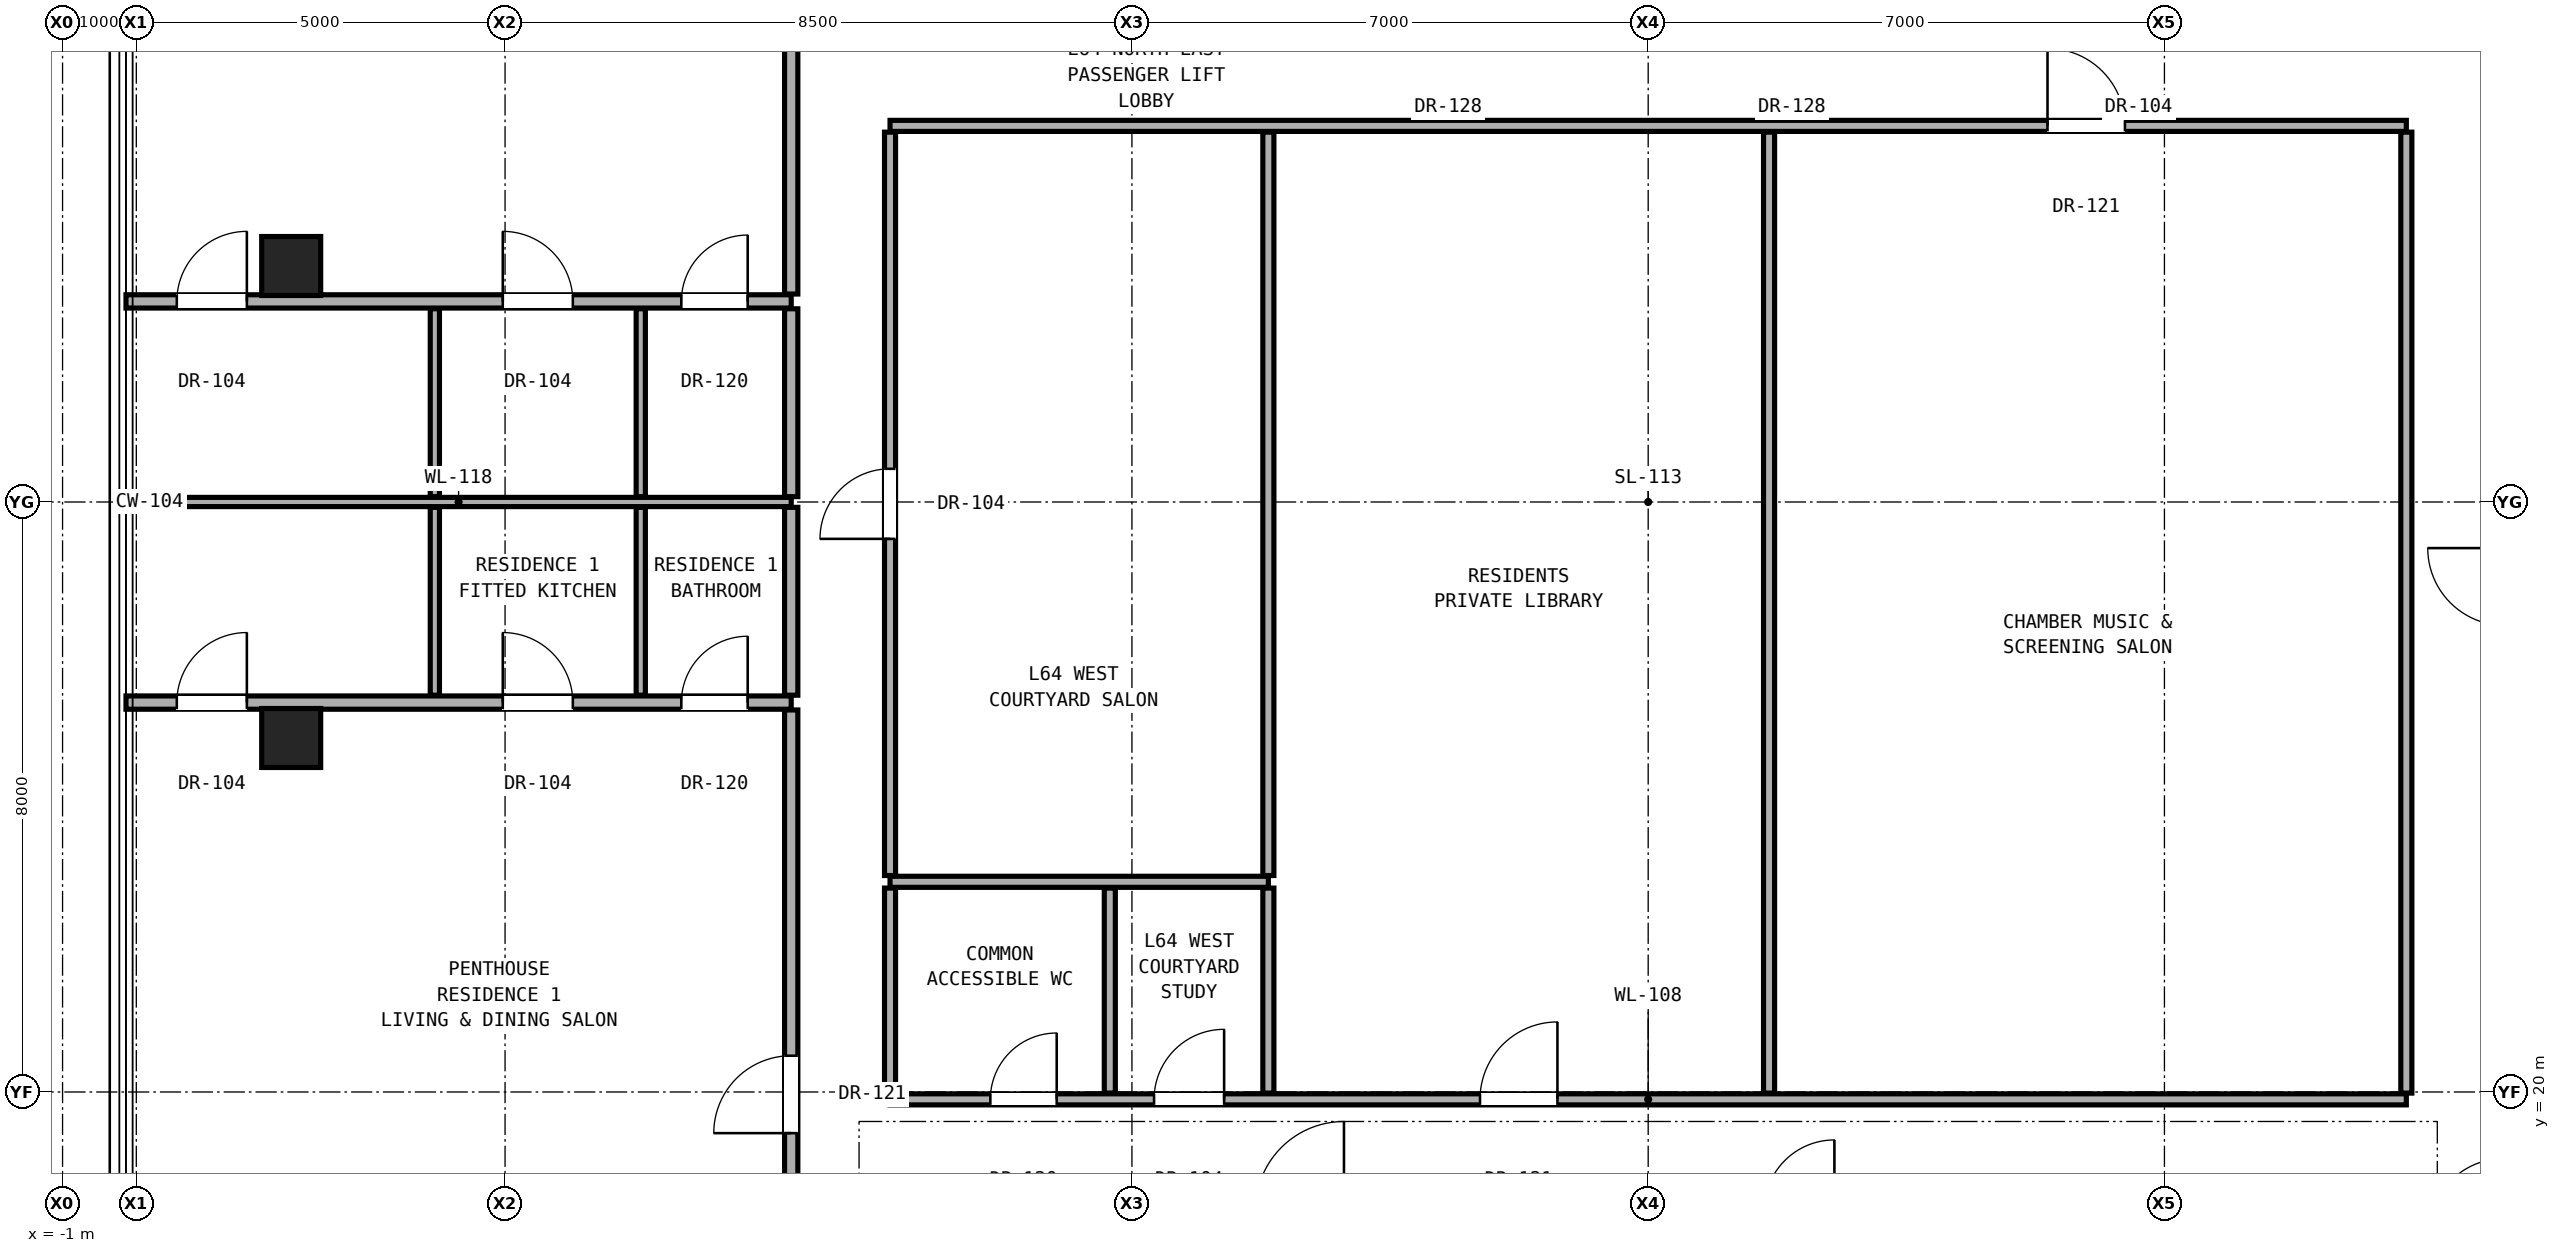
"""IFC4 building model, lengths in metres.
Left out: names, types, materials, properties, quantities, classifications, styles, units other than length and angle.
Written with IfcOpenShell. Run it as: python <this file> out.ifc"""

import sys

from ifc_helpers import new_model, si_unit, direction, frame, frame_2d, origin, origin_2d, place, context, subcontext, project, spatial, rectangle, hollow_rectangle, extrude, element, fill, save


model = new_model("IFC4")
c1 = context("Model", 3, precision=1e-05, world=origin(), true_north=direction((0.0, 1.0)))
c2 = subcontext(c1, "Body", "Model", "MODEL_VIEW")
j1 = project(units=[si_unit("LENGTHUNIT", "METRE"), si_unit("PLANEANGLEUNIT", "RADIAN")], contexts=[c1])
p1 = place(None, origin())
s1 = spatial("IfcSite", under=j1, at=p1, CompositionType="ELEMENT")
p2 = place(p1, origin())
s2 = spatial("IfcBuilding", under=s1, at=p2, CompositionType="ELEMENT")
p3 = place(p2, frame((0.0, 0.0, 226.0)))
s3 = spatial("IfcBuildingStorey", under=s2, at=p3, CompositionType="ELEMENT", Elevation=226.0)
for number, where, z_axis, x_axis in (
    (1, (2.1, 24.8, 0.0), (0.0, 0.0, 1.0), (1.0, 0.0, 0.0)),
    (2, (2.1, 31.2, 0.0), (0.0, 0.0, 1.0), (1.0, 0.0, 0.0)),
):
    element("IfcColumn", number, at=place(p3, frame(where, z_axis=z_axis, x_axis=x_axis)), inside=s3, PredefinedType="COLUMN", context=c2, shape_type="SweptSolid", body=[
        extrude(hollow_rectangle(XDim=0.8, YDim=0.8, WallThickness=0.045, at=origin_2d()), origin(), (0.0, 0.0, 1.0), 3.3),
    ])
p4 = place(p3, frame((10.22, 19.9, 0.0), z_axis=(0.0, 0.0, 1.0), x_axis=(1.0, 0.0, 0.0)))
e3 = element("IfcWall", 3, at=p4, inside=s3, PredefinedType="PARTITIONING", context=c2, shape_type="SweptSolid", body=[
    extrude(rectangle(XDim=20.56, YDim=0.15, at=frame_2d((10.28, 0.0))), origin(), (0.0, 0.0, 1.0), 2.236),
])
p5 = place(p4, frame((1.36, 0.0, 0.0)))
e4 = element("IfcOpeningElement", 4, at=p5, cuts=e3, PredefinedType="OPENING", context=c2, shape_type="SweptSolid", body=[
    extrude(rectangle(XDim=0.9, YDim=2.1, at=frame_2d((0.45, 1.05))), frame((0.0, 0.085, 0.0), z_axis=(0.0, -1.0, 0.0), x_axis=(1.0, 0.0, 0.0)), (0.0, 0.0, 1.0), 0.17),
])
p6 = place(p4, frame((3.58, 0.0, 0.0)))
e5 = element("IfcOpeningElement", 5, at=p6, cuts=e3, PredefinedType="OPENING", context=c2, shape_type="SweptSolid", body=[
    extrude(rectangle(XDim=0.95, YDim=2.15, at=frame_2d((0.475, 1.075))), frame((0.0, 0.085, 0.0), z_axis=(0.0, -1.0, 0.0), x_axis=(1.0, 0.0, 0.0)), (0.0, 0.0, 1.0), 0.17),
])
p7 = place(p4, frame((8.0, 0.0, 0.0)))
e6 = element("IfcOpeningElement", 6, at=p7, cuts=e3, PredefinedType="OPENING", context=c2, shape_type="SweptSolid", body=[
    extrude(rectangle(XDim=1.05, YDim=2.2, at=frame_2d((0.525, 1.1))), frame((0.0, 0.085, 0.0), z_axis=(0.0, -1.0, 0.0), x_axis=(1.0, 0.0, 0.0)), (0.0, 0.0, 1.0), 0.17),
])
p8 = place(p3, frame((10.22, 22.85, 0.0), z_axis=(0.0, 0.0, 1.0), x_axis=(1.0, 0.0, 0.0)))
e7 = element("IfcWall", 7, at=p8, inside=s3, PredefinedType="PARTITIONING", context=c2, shape_type="SweptSolid", body=[
    extrude(rectangle(XDim=5.13, YDim=0.15, at=frame_2d((2.565, 0.0))), origin(), (0.0, 0.0, 1.0), 2.236),
])
p9 = place(p3, frame((-0.14, 25.28, 0.0), z_axis=(0.0, 0.0, 1.0), x_axis=(1.0, 0.0, 0.0)))
e8 = element("IfcWall", 8, at=p9, inside=s3, PredefinedType="PARTITIONING", context=c2, shape_type="SweptSolid", body=[
    extrude(rectangle(XDim=9.02, YDim=0.18, at=frame_2d((4.51, 0.0))), origin(), (0.0, 0.0, 1.0), 2.319),
])
p10 = place(p9, frame((0.689, 0.0, 0.0)))
e9 = element("IfcOpeningElement", 9, at=p10, cuts=e8, PredefinedType="OPENING", context=c2, shape_type="SweptSolid", body=[
    extrude(rectangle(XDim=0.95, YDim=2.15, at=frame_2d((0.475, 1.075))), frame((0.0, 0.1, 0.0), z_axis=(0.0, -1.0, 0.0), x_axis=(1.0, 0.0, 0.0)), (0.0, 0.0, 1.0), 0.2),
])
p11 = place(p9, frame((5.109, 0.0, 0.0)))
e10 = element("IfcOpeningElement", 10, at=p11, cuts=e8, PredefinedType="OPENING", context=c2, shape_type="SweptSolid", body=[
    extrude(rectangle(XDim=0.95, YDim=2.15, at=frame_2d((0.475, 1.075))), frame((0.0, 0.1, 0.0), z_axis=(0.0, -1.0, 0.0), x_axis=(1.0, 0.0, 0.0)), (0.0, 0.0, 1.0), 0.2),
])
p12 = place(p9, frame((7.53, 0.0, 0.0)))
e11 = element("IfcOpeningElement", 11, at=p12, cuts=e8, PredefinedType="OPENING", context=c2, shape_type="SweptSolid", body=[
    extrude(rectangle(XDim=0.9, YDim=2.1, at=frame_2d((0.45, 1.05))), frame((0.0, 0.1, 0.0), z_axis=(0.0, -1.0, 0.0), x_axis=(1.0, 0.0, 0.0)), (0.0, 0.0, 1.0), 0.2),
])
p13 = place(p3, frame((-0.14, 28.0, 0.0), z_axis=(0.0, 0.0, 1.0), x_axis=(1.0, 0.0, 0.0)))
e12 = element("IfcWall", 12, at=p13, inside=s3, PredefinedType="PARTITIONING", context=c2, shape_type="SweptSolid", body=[
    extrude(rectangle(XDim=9.02, YDim=0.125, at=frame_2d((4.51, 0.0))), origin(), (0.0, 0.0, 1.0), 2.319),
])
p14 = place(p3, frame((-0.14, 30.72, 0.0), z_axis=(0.0, 0.0, 1.0), x_axis=(1.0, 0.0, 0.0)))
e13 = element("IfcWall", 13, at=p14, inside=s3, PredefinedType="PARTITIONING", context=c2, shape_type="SweptSolid", body=[
    extrude(rectangle(XDim=9.02, YDim=0.18, at=frame_2d((4.51, 0.0))), origin(), (0.0, 0.0, 1.0), 2.319),
])
p15 = place(p14, frame((0.689, 0.0, 0.0)))
e14 = element("IfcOpeningElement", 14, at=p15, cuts=e13, PredefinedType="OPENING", context=c2, shape_type="SweptSolid", body=[
    extrude(rectangle(XDim=0.95, YDim=2.15, at=frame_2d((0.475, 1.075))), frame((0.0, 0.1, 0.0), z_axis=(0.0, -1.0, 0.0), x_axis=(1.0, 0.0, 0.0)), (0.0, 0.0, 1.0), 0.2),
])
p16 = place(p14, frame((5.109, 0.0, 0.0)))
e15 = element("IfcOpeningElement", 15, at=p16, cuts=e13, PredefinedType="OPENING", context=c2, shape_type="SweptSolid", body=[
    extrude(rectangle(XDim=0.95, YDim=2.15, at=frame_2d((0.475, 1.075))), frame((0.0, 0.1, 0.0), z_axis=(0.0, -1.0, 0.0), x_axis=(1.0, 0.0, 0.0)), (0.0, 0.0, 1.0), 0.2),
])
p17 = place(p14, frame((7.53, 0.0, 0.0)))
e16 = element("IfcOpeningElement", 16, at=p17, cuts=e13, PredefinedType="OPENING", context=c2, shape_type="SweptSolid", body=[
    extrude(rectangle(XDim=0.9, YDim=2.1, at=frame_2d((0.45, 1.05))), frame((0.0, 0.1, 0.0), z_axis=(0.0, -1.0, 0.0), x_axis=(1.0, 0.0, 0.0)), (0.0, 0.0, 1.0), 0.2),
])
p18 = place(p3, frame((10.22, 33.1, 0.0), z_axis=(0.0, 0.0, 1.0), x_axis=(1.0, 0.0, 0.0)))
e17 = element("IfcWall", 17, at=p18, inside=s3, PredefinedType="PARTITIONING", context=c2, shape_type="SweptSolid", body=[
    extrude(rectangle(XDim=20.56, YDim=0.15, at=frame_2d((10.28, 0.0))), origin(), (0.0, 0.0, 1.0), 2.236),
])
p19 = place(p18, frame((15.695, 0.0, 0.0)))
e18 = element("IfcOpeningElement", 18, at=p19, cuts=e17, PredefinedType="OPENING", context=c2, shape_type="SweptSolid", body=[
    extrude(rectangle(XDim=1.05, YDim=2.2, at=frame_2d((0.525, 1.1))), frame((0.0, 0.085, 0.0), z_axis=(0.0, -1.0, 0.0), x_axis=(1.0, 0.0, 0.0)), (0.0, 0.0, 1.0), 0.17),
])
for number, where, z_axis, x_axis in (
    (19, (4.048, 25.38, 0.0), (0.0, 0.0, 1.0), (0.0, 1.0, 0.0)),
    (20, (4.048, 28.073, 0.0), (0.0, 0.0, 1.0), (0.0, 1.0, 0.0)),
    (21, (6.84, 25.38, 0.0), (0.0, 0.0, 1.0), (0.0, 1.0, 0.0)),
    (22, (6.84, 28.073, 0.0), (0.0, 0.0, 1.0), (0.0, 1.0, 0.0)),
):
    element("IfcWall", number, at=place(p3, frame(where, z_axis=z_axis, x_axis=x_axis)), inside=s3, PredefinedType="PARTITIONING", context=c2, shape_type="SweptSolid", body=[
        extrude(rectangle(XDim=2.548, YDim=0.125, at=frame_2d((1.274, 0.0))), origin(), (0.0, 0.0, 1.0), 3.1),
    ])
p20 = place(p3, frame((8.88, 14.754, 0.0), z_axis=(0.0, 0.0, 1.0), x_axis=(0.0, 1.0, 0.0)))
e23 = element("IfcWall", 23, at=p20, inside=s3, PredefinedType="PARTITIONING", context=c2, shape_type="SweptSolid", body=[
    extrude(rectangle(XDim=10.426, YDim=0.18, at=frame_2d((5.213, 0.0))), origin(), (0.0, 0.0, 1.0), 2.396),
])
p21 = place(p20, frame((4.688, 0.0, 0.0)))
e24 = element("IfcOpeningElement", 24, at=p21, cuts=e23, PredefinedType="OPENING", context=c2, shape_type="SweptSolid", body=[
    extrude(rectangle(XDim=1.05, YDim=2.2, at=frame_2d((0.525, 1.1))), frame((0.0, 0.1, 0.0), z_axis=(0.0, -1.0, 0.0), x_axis=(1.0, 0.0, 0.0)), (0.0, 0.0, 1.0), 0.2),
])
for number, where, z_axis, x_axis in (
    (25, (8.88, 25.38, 0.0), (0.0, 0.0, 1.0), (0.0, 1.0, 0.0)),
    (26, (8.88, 28.073, 0.0), (0.0, 0.0, 1.0), (0.0, 1.0, 0.0)),
):
    element("IfcWall", number, at=place(p3, frame(where, z_axis=z_axis, x_axis=x_axis)), inside=s3, PredefinedType="PARTITIONING", context=c2, shape_type="SweptSolid", body=[
        extrude(rectangle(XDim=2.548, YDim=0.18, at=frame_2d((1.274, 0.0))), origin(), (0.0, 0.0, 1.0), 3.1),
    ])
p22 = place(p3, frame((8.88, 30.82, 0.0), z_axis=(0.0, 0.0, 1.0), x_axis=(0.0, 1.0, 0.0)))
e27 = element("IfcWall", 27, at=p22, inside=s3, PredefinedType="PARTITIONING", context=c2, shape_type="SweptSolid", body=[
    extrude(rectangle(XDim=10.426, YDim=0.18, at=frame_2d((5.213, 0.0))), origin(), (0.0, 0.0, 1.0), 2.396),
])
p23 = place(p22, frame((4.688, 0.0, 0.0)))
e28 = element("IfcOpeningElement", 28, at=p23, cuts=e27, PredefinedType="OPENING", context=c2, shape_type="SweptSolid", body=[
    extrude(rectangle(XDim=1.05, YDim=2.2, at=frame_2d((0.525, 1.1))), frame((0.0, 0.1, 0.0), z_axis=(0.0, -1.0, 0.0), x_axis=(1.0, 0.0, 0.0)), (0.0, 0.0, 1.0), 0.2),
])
p24 = place(p3, frame((10.22, 19.985, 0.0), z_axis=(0.0, 0.0, 1.0), x_axis=(0.0, 1.0, 0.0)))
e29 = element("IfcWall", 29, at=p24, inside=s3, PredefinedType="PARTITIONING", context=c2, shape_type="SweptSolid", body=[
    extrude(rectangle(XDim=2.78, YDim=0.15, at=frame_2d((1.39, 0.0))), origin(), (0.0, 0.0, 1.0), 3.1),
])
p25 = place(p3, frame((10.22, 22.935, 0.0), z_axis=(0.0, 0.0, 1.0), x_axis=(0.0, 1.0, 0.0)))
e30 = element("IfcWall", 30, at=p25, inside=s3, PredefinedType="PARTITIONING", context=c2, shape_type="SweptSolid", body=[
    extrude(rectangle(XDim=10.08, YDim=0.15, at=frame_2d((5.04, 0.0))), origin(), (0.0, 0.0, 1.0), 2.396),
])
p26 = place(p25, frame((4.565, 0.0, 0.0)))
e31 = element("IfcOpeningElement", 31, at=p26, cuts=e30, PredefinedType="OPENING", context=c2, shape_type="SweptSolid", body=[
    extrude(rectangle(XDim=0.95, YDim=2.15, at=frame_2d((0.475, 1.075))), frame((0.0, 0.085, 0.0), z_axis=(0.0, -1.0, 0.0), x_axis=(1.0, 0.0, 0.0)), (0.0, 0.0, 1.0), 0.17),
])
for number, where, z_axis, x_axis in (
    (32, (13.2, 19.985, 0.0), (0.0, 0.0, 1.0), (0.0, 1.0, 0.0)),
    (33, (15.35, 19.985, 0.0), (0.0, 0.0, 1.0), (0.0, 1.0, 0.0)),
):
    element("IfcWall", number, at=place(p3, frame(where, z_axis=z_axis, x_axis=x_axis)), inside=s3, PredefinedType="PARTITIONING", context=c2, shape_type="SweptSolid", body=[
        extrude(rectangle(XDim=2.78, YDim=0.15, at=frame_2d((1.39, 0.0))), origin(), (0.0, 0.0, 1.0), 3.1),
    ])
p27 = place(p3, frame((15.35, 22.935, 0.0), z_axis=(0.0, 0.0, 1.0), x_axis=(0.0, 1.0, 0.0)))
e34 = element("IfcWall", 34, at=p27, inside=s3, PredefinedType="PARTITIONING", context=c2, shape_type="SweptSolid", body=[
    extrude(rectangle(XDim=10.08, YDim=0.15, at=frame_2d((5.04, 0.0))), origin(), (0.0, 0.0, 1.0), 2.236),
])
p28 = place(p3, frame((22.139, 19.985, 0.0), z_axis=(0.0, 0.0, 1.0), x_axis=(0.0, 1.0, 0.0)))
e35 = element("IfcWall", 35, at=p28, inside=s3, PredefinedType="PARTITIONING", context=c2, shape_type="SweptSolid", body=[
    extrude(rectangle(XDim=13.03, YDim=0.15, at=frame_2d((6.515, 0.0))), origin(), (0.0, 0.0, 1.0), 2.236),
])
p29 = place(p3, frame((30.78, 19.985, 0.0), z_axis=(0.0, 0.0, 1.0), x_axis=(0.0, 1.0, 0.0)))
e36 = element("IfcWall", 36, at=p29, inside=s3, PredefinedType="PARTITIONING", context=c2, shape_type="SweptSolid", body=[
    extrude(rectangle(XDim=13.03, YDim=0.15, at=frame_2d((6.515, 0.0))), origin(), (0.0, 0.0, 1.0), 2.396),
])
p30 = place(p5, origin())
e37 = element("IfcDoor", 37, at=p30, inside=s3, OperationType="SINGLE_SWING_RIGHT", PredefinedType="DOOR", context=c2, shape_type="SweptSolid", body=[
    extrude(rectangle(XDim=0.9, YDim=2.1, at=frame_2d((0.45, 1.05))), frame((0.0, 0.025, 0.0), z_axis=(0.0, -1.0, 0.0), x_axis=(1.0, 0.0, 0.0)), (0.0, 0.0, 1.0), 0.05),
])
fill(e4, e37)
p31 = place(p21, origin())
e38 = element("IfcDoor", 38, at=p31, inside=s3, OperationType="SINGLE_SWING_LEFT", PredefinedType="DOOR", context=c2, shape_type="SweptSolid", body=[
    extrude(rectangle(XDim=1.05, YDim=2.2, at=frame_2d((0.525, 1.1))), frame((0.0, 0.025, 0.0), z_axis=(0.0, -1.0, 0.0), x_axis=(1.0, 0.0, 0.0)), (0.0, 0.0, 1.0), 0.05),
])
fill(e24, e38)
p32 = place(p10, origin())
e39 = element("IfcDoor", 39, at=p32, inside=s3, OperationType="SINGLE_SWING_RIGHT", PredefinedType="DOOR", context=c2, shape_type="SweptSolid", body=[
    extrude(rectangle(XDim=0.95, YDim=2.15, at=frame_2d((0.475, 1.075))), frame((0.0, 0.025, 0.0), z_axis=(0.0, -1.0, 0.0), x_axis=(1.0, 0.0, 0.0)), (0.0, 0.0, 1.0), 0.05),
])
fill(e9, e39)
p33 = place(p11, origin())
e40 = element("IfcDoor", 40, at=p33, inside=s3, OperationType="SINGLE_SWING_LEFT", PredefinedType="DOOR", context=c2, shape_type="SweptSolid", body=[
    extrude(rectangle(XDim=0.95, YDim=2.15, at=frame_2d((0.475, 1.075))), frame((0.0, 0.025, 0.0), z_axis=(0.0, -1.0, 0.0), x_axis=(1.0, 0.0, 0.0)), (0.0, 0.0, 1.0), 0.05),
])
fill(e10, e40)
p34 = place(p12, origin())
e41 = element("IfcDoor", 41, at=p34, inside=s3, OperationType="SINGLE_SWING_RIGHT", PredefinedType="DOOR", context=c2, shape_type="SweptSolid", body=[
    extrude(rectangle(XDim=0.9, YDim=2.1, at=frame_2d((0.45, 1.05))), frame((0.0, 0.025, 0.0), z_axis=(0.0, -1.0, 0.0), x_axis=(1.0, 0.0, 0.0)), (0.0, 0.0, 1.0), 0.05),
])
fill(e11, e41)
p35 = place(p15, origin())
e42 = element("IfcDoor", 42, at=p35, inside=s3, OperationType="SINGLE_SWING_RIGHT", PredefinedType="DOOR", context=c2, shape_type="SweptSolid", body=[
    extrude(rectangle(XDim=0.95, YDim=2.15, at=frame_2d((0.475, 1.075))), frame((0.0, 0.025, 0.0), z_axis=(0.0, -1.0, 0.0), x_axis=(1.0, 0.0, 0.0)), (0.0, 0.0, 1.0), 0.05),
])
fill(e14, e42)
p36 = place(p16, origin())
e43 = element("IfcDoor", 43, at=p36, inside=s3, OperationType="SINGLE_SWING_LEFT", PredefinedType="DOOR", context=c2, shape_type="SweptSolid", body=[
    extrude(rectangle(XDim=0.95, YDim=2.15, at=frame_2d((0.475, 1.075))), frame((0.0, 0.025, 0.0), z_axis=(0.0, -1.0, 0.0), x_axis=(1.0, 0.0, 0.0)), (0.0, 0.0, 1.0), 0.05),
])
fill(e15, e43)
p37 = place(p17, origin())
e44 = element("IfcDoor", 44, at=p37, inside=s3, OperationType="SINGLE_SWING_RIGHT", PredefinedType="DOOR", context=c2, shape_type="SweptSolid", body=[
    extrude(rectangle(XDim=0.9, YDim=2.1, at=frame_2d((0.45, 1.05))), frame((0.0, 0.025, 0.0), z_axis=(0.0, -1.0, 0.0), x_axis=(1.0, 0.0, 0.0)), (0.0, 0.0, 1.0), 0.05),
])
fill(e16, e44)
p38 = place(p6, origin())
e45 = element("IfcDoor", 45, at=p38, inside=s3, OperationType="SINGLE_SWING_RIGHT", PredefinedType="DOOR", context=c2, shape_type="SweptSolid", body=[
    extrude(rectangle(XDim=0.95, YDim=2.15, at=frame_2d((0.475, 1.075))), frame((0.0, 0.025, 0.0), z_axis=(0.0, -1.0, 0.0), x_axis=(1.0, 0.0, 0.0)), (0.0, 0.0, 1.0), 0.05),
])
fill(e5, e45)
p39 = place(p26, origin())
e46 = element("IfcDoor", 46, at=p39, inside=s3, OperationType="SINGLE_SWING_LEFT", PredefinedType="DOOR", context=c2, shape_type="SweptSolid", body=[
    extrude(rectangle(XDim=0.95, YDim=2.15, at=frame_2d((0.475, 1.075))), frame((0.0, 0.025, 0.0), z_axis=(0.0, -1.0, 0.0), x_axis=(1.0, 0.0, 0.0)), (0.0, 0.0, 1.0), 0.05),
])
fill(e31, e46)
p40 = place(p7, origin())
e47 = element("IfcDoor", 47, at=p40, inside=s3, OperationType="SINGLE_SWING_RIGHT", PredefinedType="DOOR", context=c2, shape_type="SweptSolid", body=[
    extrude(rectangle(XDim=1.05, YDim=2.2, at=frame_2d((0.525, 1.1))), frame((0.0, 0.025, 0.0), z_axis=(0.0, -1.0, 0.0), x_axis=(1.0, 0.0, 0.0)), (0.0, 0.0, 1.0), 0.05),
])
fill(e6, e47)
p41 = place(p19, origin())
e48 = element("IfcDoor", 48, at=p41, inside=s3, OperationType="SINGLE_SWING_LEFT", PredefinedType="DOOR", context=c2, shape_type="SweptSolid", body=[
    extrude(rectangle(XDim=1.05, YDim=2.2, at=frame_2d((0.525, 1.1))), frame((0.0, 0.025, 0.0), z_axis=(0.0, -1.0, 0.0), x_axis=(1.0, 0.0, 0.0)), (0.0, 0.0, 1.0), 0.05),
])
fill(e18, e48)
save(model, sys.argv[1])
